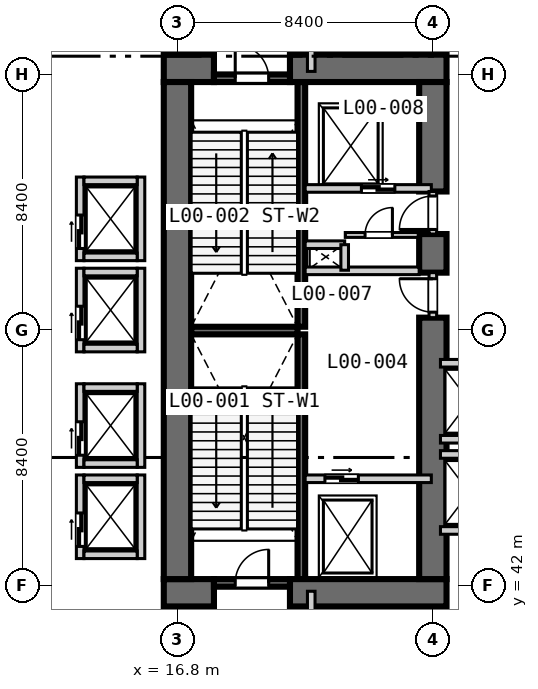
"""IFC4 building model, lengths in metres.
Left out: names, types, materials, properties, quantities, classifications, styles, units other than length and angle.
Written with IfcOpenShell. Run it as: python <this file> out.ifc"""

import sys

from ifc_helpers import new_model, si_unit, direction, frame, frame_2d, origin, place, context, subcontext, project, spatial, rectangle, extrude, element, fill, save


model = new_model("IFC4")
c1 = context("Model", 3, precision=1e-05, world=origin(), true_north=direction((0.0, 1.0)))
c2 = subcontext(c1, "Body", "Model", "MODEL_VIEW")
j1 = project(units=[si_unit("LENGTHUNIT", "METRE"), si_unit("PLANEANGLEUNIT", "RADIAN")], contexts=[c1])
p1 = place(None, origin())
s1 = spatial("IfcSite", under=j1, at=p1, CompositionType="ELEMENT")
p2 = place(p1, origin())
s2 = spatial("IfcBuilding", under=s1, at=p2, CompositionType="ELEMENT")
p3 = place(p2, origin())
s3 = spatial("IfcBuildingStorey", under=s2, at=p3, CompositionType="ELEMENT", Elevation=0.0)
for number, where, z_axis, x_axis in (
    (1, (20.875, 42.2, 0.0), (0.0, 0.0, 1.0), (0.0, 1.0, 0.0)),
    (2, (20.875, 50.5, 0.0), (0.0, 0.0, 1.0), (0.0, 1.0, 0.0)),
):
    element("IfcWall", number, at=place(p3, frame(where, z_axis=z_axis, x_axis=x_axis)), inside=s3, PredefinedType="SOLIDWALL", context=c2, shape_type="SweptSolid", body=[
        extrude(rectangle(XDim=8.05, YDim=0.25, at=frame_2d((4.025, 0.0))), origin(), (0.0, 0.0, 1.0), 5.65),
    ])
p4 = place(p3, frame((17.25, 50.375, 0.0), z_axis=(0.0, 0.0, 1.0), x_axis=(1.0, 0.0, 0.0)))
e3 = element("IfcWall", 3, at=p4, inside=s3, PredefinedType="SOLIDWALL", context=c2, shape_type="SweptSolid", body=[
    extrude(rectangle(XDim=3.5, YDim=0.25, at=frame_2d((1.75, 0.0))), origin(), (0.0, 0.0, 1.0), 5.65),
])
p5 = place(p3, frame((16.35, 41.75, 0.0), z_axis=(0.0, 0.0, 1.0), x_axis=(1.0, 0.0, 0.0)))
e4 = element("IfcWall", 4, at=p5, inside=s3, PredefinedType="SHEAR", context=c2, shape_type="SweptSolid", body=[
    extrude(rectangle(XDim=1.65, YDim=0.9, at=frame_2d((0.825, 0.0))), origin(), (0.0, 0.0, 1.0), 5.65),
])
p6 = place(p3, frame((20.5, 41.75, 0.0), z_axis=(0.0, 0.0, 1.0), x_axis=(1.0, 0.0, 0.0)))
e5 = element("IfcWall", 5, at=p6, inside=s3, PredefinedType="SHEAR", context=c2, shape_type="SweptSolid", body=[
    extrude(rectangle(XDim=5.15, YDim=0.9, at=frame_2d((2.575, 0.0))), origin(), (0.0, 0.0, 1.0), 5.65),
])
p7 = place(p3, frame((16.35, 59.0, 0.0), z_axis=(0.0, 0.0, 1.0), x_axis=(1.0, 0.0, 0.0)))
e6 = element("IfcWall", 6, at=p7, inside=s3, PredefinedType="SHEAR", context=c2, shape_type="SweptSolid", body=[
    extrude(rectangle(XDim=1.65, YDim=0.9, at=frame_2d((0.825, 0.0))), origin(), (0.0, 0.0, 1.0), 5.65),
])
p8 = place(p3, frame((20.5, 59.0, 0.0), z_axis=(0.0, 0.0, 1.0), x_axis=(1.0, 0.0, 0.0)))
e7 = element("IfcWall", 7, at=p8, inside=s3, PredefinedType="SHEAR", context=c2, shape_type="SweptSolid", body=[
    extrude(rectangle(XDim=5.15, YDim=0.9, at=frame_2d((2.575, 0.0))), origin(), (0.0, 0.0, 1.0), 5.65),
])
p9 = place(p3, frame((16.8, 42.2, 0.0), z_axis=(0.0, 0.0, 1.0), x_axis=(0.0, 1.0, 0.0)))
e8 = element("IfcWall", 8, at=p9, inside=s3, PredefinedType="SHEAR", context=c2, shape_type="SweptSolid", body=[
    extrude(rectangle(XDim=16.35, YDim=0.9, at=frame_2d((8.175, 0.0))), origin(), (0.0, 0.0, 1.0), 5.65),
])
p10 = place(p3, frame((25.2, 42.2, 0.0), z_axis=(0.0, 0.0, 1.0), x_axis=(0.0, 1.0, 0.0)))
e9 = element("IfcWall", 9, at=p10, inside=s3, PredefinedType="SHEAR", context=c2, shape_type="SweptSolid", body=[
    extrude(rectangle(XDim=8.6, YDim=0.9, at=frame_2d((4.3, 0.0))), origin(), (0.0, 0.0, 1.0), 5.65),
])
p11 = place(p3, frame((25.2, 52.28, 0.0), z_axis=(0.0, 0.0, 1.0), x_axis=(0.0, 1.0, 0.0)))
e10 = element("IfcWall", 10, at=p11, inside=s3, PredefinedType="SHEAR", context=c2, shape_type="SweptSolid", body=[
    extrude(rectangle(XDim=1.27, YDim=0.9, at=frame_2d((0.635, 0.0))), origin(), (0.0, 0.0, 1.0), 5.65),
])
p12 = place(p3, frame((25.2, 54.95, 0.0), z_axis=(0.0, 0.0, 1.0), x_axis=(0.0, 1.0, 0.0)))
e11 = element("IfcWall", 11, at=p12, inside=s3, PredefinedType="SHEAR", context=c2, shape_type="SweptSolid", body=[
    extrude(rectangle(XDim=3.6, YDim=0.9, at=frame_2d((1.8, 0.0))), origin(), (0.0, 0.0, 1.0), 5.65),
])
p13 = place(p3, frame((18.0, 42.075, 0.0), z_axis=(0.0, 0.0, 1.0), x_axis=(1.0, 0.0, 0.0)))
e12 = element("IfcWall", 12, at=p13, inside=s3, PredefinedType="SOLIDWALL", context=c2, shape_type="SweptSolid", body=[
    extrude(rectangle(XDim=2.5, YDim=0.25, at=frame_2d((1.25, 0.0))), origin(), (0.0, 0.0, 1.0), 5.65),
])
p14 = place(p13, frame((0.7, 0.0, 0.0)))
e13 = element("IfcOpeningElement", 13, at=p14, cuts=e12, PredefinedType="OPENING", context=c2, shape_type="SweptSolid", body=[
    extrude(rectangle(XDim=1.1, YDim=2.15, at=frame_2d((0.55, 1.075))), frame((0.0, 0.135, 0.0), z_axis=(0.0, -1.0, 0.0), x_axis=(1.0, 0.0, 0.0)), (0.0, 0.0, 1.0), 0.27),
])
p15 = place(p3, frame((18.0, 58.675, 0.0), z_axis=(0.0, 0.0, 1.0), x_axis=(1.0, 0.0, 0.0)))
e14 = element("IfcWall", 14, at=p15, inside=s3, PredefinedType="SOLIDWALL", context=c2, shape_type="SweptSolid", body=[
    extrude(rectangle(XDim=2.5, YDim=0.25, at=frame_2d((1.25, 0.0))), origin(), (0.0, 0.0, 1.0), 5.65),
])
p16 = place(p15, frame((0.7, 0.0, 0.0)))
e15 = element("IfcOpeningElement", 15, at=p16, cuts=e14, PredefinedType="OPENING", context=c2, shape_type="SweptSolid", body=[
    extrude(rectangle(XDim=1.1, YDim=2.15, at=frame_2d((0.55, 1.075))), frame((0.0, 0.135, 0.0), z_axis=(0.0, -1.0, 0.0), x_axis=(1.0, 0.0, 0.0)), (0.0, 0.0, 1.0), 0.27),
])
p17 = place(p3, frame((21.0, 45.5, 0.0), z_axis=(0.0, 0.0, 1.0), x_axis=(1.0, 0.0, 0.0)))
e16 = element("IfcWall", 16, at=p17, inside=s3, PredefinedType="SOLIDWALL", context=c2, shape_type="SweptSolid", body=[
    extrude(rectangle(XDim=4.15, YDim=0.25, at=frame_2d((2.075, 0.0))), origin(), (0.0, 0.0, 1.0), 5.65),
])
p18 = place(p17, frame((0.65, 0.0, 0.0)))
e17 = element("IfcOpeningElement", 17, at=p18, cuts=e16, PredefinedType="OPENING", context=c2, shape_type="SweptSolid", body=[
    extrude(rectangle(XDim=1.1, YDim=2.15, at=frame_2d((0.55, 1.075))), frame((0.0, 0.135, 0.0), z_axis=(0.0, -1.0, 0.0), x_axis=(1.0, 0.0, 0.0)), (0.0, 0.0, 1.0), 0.27),
])
p19 = place(p3, frame((25.2, 50.8, 0.0), z_axis=(0.0, 0.0, 1.0), x_axis=(0.0, 1.0, 0.0)))
e18 = element("IfcWall", 18, at=p19, inside=s3, PredefinedType="SOLIDWALL", context=c2, shape_type="SweptSolid", body=[
    extrude(rectangle(XDim=1.48, YDim=0.25, at=frame_2d((0.74, 0.0))), origin(), (0.0, 0.0, 1.0), 5.65),
])
p20 = place(p19, frame((0.18, 0.0, 0.0)))
e19 = element("IfcOpeningElement", 19, at=p20, cuts=e18, PredefinedType="OPENING", context=c2, shape_type="SweptSolid", body=[
    extrude(rectangle(XDim=1.1, YDim=2.15, at=frame_2d((0.55, 1.075))), frame((0.0, 0.135, 0.0), z_axis=(0.0, -1.0, 0.0), x_axis=(1.0, 0.0, 0.0)), (0.0, 0.0, 1.0), 0.27),
])
p21 = place(p3, frame((21.0, 52.34, 0.0), z_axis=(0.0, 0.0, 1.0), x_axis=(1.0, 0.0, 0.0)))
e20 = element("IfcWall", 20, at=p21, inside=s3, PredefinedType="SOLIDWALL", context=c2, shape_type="SweptSolid", body=[
    extrude(rectangle(XDim=3.75, YDim=0.25, at=frame_2d((1.875, 0.0))), origin(), (0.0, 0.0, 1.0), 5.65),
])
p22 = place(p3, frame((21.0, 55.05, 0.0), z_axis=(0.0, 0.0, 1.0), x_axis=(1.0, 0.0, 0.0)))
e21 = element("IfcWall", 21, at=p22, inside=s3, PredefinedType="SOLIDWALL", context=c2, shape_type="SweptSolid", body=[
    extrude(rectangle(XDim=4.15, YDim=0.25, at=frame_2d((2.075, 0.0))), origin(), (0.0, 0.0, 1.0), 5.65),
])
p23 = place(p22, frame((1.85, 0.0, 0.0)))
e22 = element("IfcOpeningElement", 22, at=p23, cuts=e21, PredefinedType="OPENING", context=c2, shape_type="SweptSolid", body=[
    extrude(rectangle(XDim=1.1, YDim=2.15, at=frame_2d((0.55, 1.075))), frame((0.0, 0.135, 0.0), z_axis=(0.0, -1.0, 0.0), x_axis=(1.0, 0.0, 0.0)), (0.0, 0.0, 1.0), 0.27),
])
p24 = place(p3, frame((25.2, 53.55, 0.0), z_axis=(0.0, 0.0, 1.0), x_axis=(0.0, 1.0, 0.0)))
e23 = element("IfcWall", 23, at=p24, inside=s3, PredefinedType="SOLIDWALL", context=c2, shape_type="SweptSolid", body=[
    extrude(rectangle(XDim=1.4, YDim=0.25, at=frame_2d((0.7, 0.0))), origin(), (0.0, 0.0, 1.0), 5.65),
])
p25 = place(p24, frame((0.15, 0.0, 0.0)))
e24 = element("IfcOpeningElement", 24, at=p25, cuts=e23, PredefinedType="OPENING", context=c2, shape_type="SweptSolid", body=[
    extrude(rectangle(XDim=1.1, YDim=2.15, at=frame_2d((0.55, 1.075))), frame((0.0, 0.135, 0.0), z_axis=(0.0, -1.0, 0.0), x_axis=(1.0, 0.0, 0.0)), (0.0, 0.0, 1.0), 0.27),
])
p26 = place(p3, frame((21.0, 53.2, 0.0), z_axis=(0.0, 0.0, 1.0), x_axis=(1.0, 0.0, 0.0)))
e25 = element("IfcWall", 25, at=p26, inside=s3, PredefinedType="SOLIDWALL", context=c2, shape_type="SweptSolid", body=[
    extrude(rectangle(XDim=1.3, YDim=0.25, at=frame_2d((0.65, 0.0))), origin(), (0.0, 0.0, 1.0), 5.65),
])
p27 = place(p3, frame((22.3, 52.36, 0.0), z_axis=(0.0, 0.0, 1.0), x_axis=(0.0, 1.0, 0.0)))
e26 = element("IfcWall", 26, at=p27, inside=s3, PredefinedType="SOLIDWALL", context=c2, shape_type="SweptSolid", body=[
    extrude(rectangle(XDim=0.84, YDim=0.25, at=frame_2d((0.42, 0.0))), origin(), (0.0, 0.0, 1.0), 5.65),
])
p28 = place(p3, frame((22.32, 53.52, 0.0), z_axis=(0.0, 0.0, 1.0), x_axis=(1.0, 0.0, 0.0)))
e27 = element("IfcWall", 27, at=p28, inside=s3, PredefinedType="PARTITIONING", context=c2, shape_type="SweptSolid", body=[
    extrude(rectangle(XDim=2.4, YDim=0.16, at=frame_2d((1.2, 0.0))), origin(), (0.0, 0.0, 1.0), 5.65),
])
p29 = place(p28, frame((0.65, 0.0, 0.0)))
e28 = element("IfcOpeningElement", 28, at=p29, cuts=e27, PredefinedType="OPENING", context=c2, shape_type="SweptSolid", body=[
    extrude(rectangle(XDim=0.9, YDim=2.1, at=frame_2d((0.45, 1.05))), frame((0.0, 0.09, 0.0), z_axis=(0.0, -1.0, 0.0), x_axis=(1.0, 0.0, 0.0)), (0.0, 0.0, 1.0), 0.18),
])
p30 = place(p3, frame((13.6, 42.875, 0.0), z_axis=(0.0, 0.0, 1.0), x_axis=(0.0, 1.0, 0.0)))
e29 = element("IfcWall", 29, at=p30, inside=s3, PredefinedType="SOLIDWALL", context=c2, shape_type="SweptSolid", body=[
    extrude(rectangle(XDim=2.75, YDim=0.25, at=frame_2d((1.375, 0.0))), origin(), (0.0, 0.0, 1.0), 5.65),
])
p31 = place(p30, frame((0.4, 0.0, 0.0)))
e30 = element("IfcOpeningElement", 30, at=p31, cuts=e29, PredefinedType="OPENING", context=c2, shape_type="SweptSolid", body=[
    extrude(rectangle(XDim=1.1, YDim=2.15, at=frame_2d((0.55, 1.075))), frame((0.0, 0.135, 0.0), z_axis=(0.0, -1.0, 0.0), x_axis=(1.0, 0.0, 0.0)), (0.0, 0.0, 1.0), 0.27),
])
p32 = place(p3, frame((15.6, 42.875, 0.0), z_axis=(0.0, 0.0, 1.0), x_axis=(0.0, 1.0, 0.0)))
e31 = element("IfcWall", 31, at=p32, inside=s3, PredefinedType="SOLIDWALL", context=c2, shape_type="SweptSolid", body=[
    extrude(rectangle(XDim=2.75, YDim=0.25, at=frame_2d((1.375, 0.0))), origin(), (0.0, 0.0, 1.0), 5.65),
])
for number, where, z_axis, x_axis in (
    (32, (13.725, 43.0, 0.0), (0.0, 0.0, 1.0), (1.0, 0.0, 0.0)),
    (33, (13.725, 45.5, 0.0), (0.0, 0.0, 1.0), (1.0, 0.0, 0.0)),
):
    element("IfcWall", number, at=place(p3, frame(where, z_axis=z_axis, x_axis=x_axis)), inside=s3, PredefinedType="SOLIDWALL", context=c2, shape_type="SweptSolid", body=[
        extrude(rectangle(XDim=1.75, YDim=0.25, at=frame_2d((0.875, 0.0))), origin(), (0.0, 0.0, 1.0), 5.65),
    ])
p33 = place(p3, frame((13.6, 45.875, 0.0), z_axis=(0.0, 0.0, 1.0), x_axis=(0.0, 1.0, 0.0)))
e34 = element("IfcWall", 34, at=p33, inside=s3, PredefinedType="SOLIDWALL", context=c2, shape_type="SweptSolid", body=[
    extrude(rectangle(XDim=2.75, YDim=0.25, at=frame_2d((1.375, 0.0))), origin(), (0.0, 0.0, 1.0), 5.65),
])
p34 = place(p33, frame((0.4, 0.0, 0.0)))
e35 = element("IfcOpeningElement", 35, at=p34, cuts=e34, PredefinedType="OPENING", context=c2, shape_type="SweptSolid", body=[
    extrude(rectangle(XDim=1.1, YDim=2.15, at=frame_2d((0.55, 1.075))), frame((0.0, 0.135, 0.0), z_axis=(0.0, -1.0, 0.0), x_axis=(1.0, 0.0, 0.0)), (0.0, 0.0, 1.0), 0.27),
])
p35 = place(p3, frame((15.6, 45.875, 0.0), z_axis=(0.0, 0.0, 1.0), x_axis=(0.0, 1.0, 0.0)))
e36 = element("IfcWall", 36, at=p35, inside=s3, PredefinedType="SOLIDWALL", context=c2, shape_type="SweptSolid", body=[
    extrude(rectangle(XDim=2.75, YDim=0.25, at=frame_2d((1.375, 0.0))), origin(), (0.0, 0.0, 1.0), 5.65),
])
for number, where, z_axis, x_axis in (
    (37, (13.725, 46.0, 0.0), (0.0, 0.0, 1.0), (1.0, 0.0, 0.0)),
    (38, (13.725, 48.5, 0.0), (0.0, 0.0, 1.0), (1.0, 0.0, 0.0)),
):
    element("IfcWall", number, at=place(p3, frame(where, z_axis=z_axis, x_axis=x_axis)), inside=s3, PredefinedType="SOLIDWALL", context=c2, shape_type="SweptSolid", body=[
        extrude(rectangle(XDim=1.75, YDim=0.25, at=frame_2d((0.875, 0.0))), origin(), (0.0, 0.0, 1.0), 5.65),
    ])
p36 = place(p3, frame((13.6, 49.675, 0.0), z_axis=(0.0, 0.0, 1.0), x_axis=(0.0, 1.0, 0.0)))
e39 = element("IfcWall", 39, at=p36, inside=s3, PredefinedType="SOLIDWALL", context=c2, shape_type="SweptSolid", body=[
    extrude(rectangle(XDim=2.75, YDim=0.25, at=frame_2d((1.375, 0.0))), origin(), (0.0, 0.0, 1.0), 5.65),
])
p37 = place(p36, frame((0.4, 0.0, 0.0)))
e40 = element("IfcOpeningElement", 40, at=p37, cuts=e39, PredefinedType="OPENING", context=c2, shape_type="SweptSolid", body=[
    extrude(rectangle(XDim=1.1, YDim=2.15, at=frame_2d((0.55, 1.075))), frame((0.0, 0.135, 0.0), z_axis=(0.0, -1.0, 0.0), x_axis=(1.0, 0.0, 0.0)), (0.0, 0.0, 1.0), 0.27),
])
p38 = place(p3, frame((15.6, 49.675, 0.0), z_axis=(0.0, 0.0, 1.0), x_axis=(0.0, 1.0, 0.0)))
e41 = element("IfcWall", 41, at=p38, inside=s3, PredefinedType="SOLIDWALL", context=c2, shape_type="SweptSolid", body=[
    extrude(rectangle(XDim=2.75, YDim=0.25, at=frame_2d((1.375, 0.0))), origin(), (0.0, 0.0, 1.0), 5.65),
])
for number, where, z_axis, x_axis in (
    (42, (13.725, 49.8, 0.0), (0.0, 0.0, 1.0), (1.0, 0.0, 0.0)),
    (43, (13.725, 52.3, 0.0), (0.0, 0.0, 1.0), (1.0, 0.0, 0.0)),
):
    element("IfcWall", number, at=place(p3, frame(where, z_axis=z_axis, x_axis=x_axis)), inside=s3, PredefinedType="SOLIDWALL", context=c2, shape_type="SweptSolid", body=[
        extrude(rectangle(XDim=1.75, YDim=0.25, at=frame_2d((0.875, 0.0))), origin(), (0.0, 0.0, 1.0), 5.65),
    ])
p39 = place(p3, frame((13.6, 52.675, 0.0), z_axis=(0.0, 0.0, 1.0), x_axis=(0.0, 1.0, 0.0)))
e44 = element("IfcWall", 44, at=p39, inside=s3, PredefinedType="SOLIDWALL", context=c2, shape_type="SweptSolid", body=[
    extrude(rectangle(XDim=2.75, YDim=0.25, at=frame_2d((1.375, 0.0))), origin(), (0.0, 0.0, 1.0), 5.65),
])
p40 = place(p39, frame((0.4, 0.0, 0.0)))
e45 = element("IfcOpeningElement", 45, at=p40, cuts=e44, PredefinedType="OPENING", context=c2, shape_type="SweptSolid", body=[
    extrude(rectangle(XDim=1.1, YDim=2.15, at=frame_2d((0.55, 1.075))), frame((0.0, 0.135, 0.0), z_axis=(0.0, -1.0, 0.0), x_axis=(1.0, 0.0, 0.0)), (0.0, 0.0, 1.0), 0.27),
])
p41 = place(p3, frame((15.6, 52.675, 0.0), z_axis=(0.0, 0.0, 1.0), x_axis=(0.0, 1.0, 0.0)))
e46 = element("IfcWall", 46, at=p41, inside=s3, PredefinedType="SOLIDWALL", context=c2, shape_type="SweptSolid", body=[
    extrude(rectangle(XDim=2.75, YDim=0.25, at=frame_2d((1.375, 0.0))), origin(), (0.0, 0.0, 1.0), 5.65),
])
for number, where, z_axis, x_axis in (
    (47, (13.725, 52.8, 0.0), (0.0, 0.0, 1.0), (1.0, 0.0, 0.0)),
    (48, (13.725, 55.3, 0.0), (0.0, 0.0, 1.0), (1.0, 0.0, 0.0)),
):
    element("IfcWall", number, at=place(p3, frame(where, z_axis=z_axis, x_axis=x_axis)), inside=s3, PredefinedType="SOLIDWALL", context=c2, shape_type="SweptSolid", body=[
        extrude(rectangle(XDim=1.75, YDim=0.25, at=frame_2d((0.875, 0.0))), origin(), (0.0, 0.0, 1.0), 5.65),
    ])
for number, where, z_axis, x_axis in (
    (49, (25.45, 43.8, 0.0), (0.0, 0.0, 1.0), (1.0, 0.0, 0.0)),
    (50, (25.45, 46.3, 0.0), (0.0, 0.0, 1.0), (1.0, 0.0, 0.0)),
    (51, (25.45, 46.8, 0.0), (0.0, 0.0, 1.0), (1.0, 0.0, 0.0)),
    (52, (25.45, 49.3, 0.0), (0.0, 0.0, 1.0), (1.0, 0.0, 0.0)),
):
    element("IfcWall", number, at=place(p3, frame(where, z_axis=z_axis, x_axis=x_axis)), inside=s3, PredefinedType="SOLIDWALL", context=c2, shape_type="SweptSolid", body=[
        extrude(rectangle(XDim=1.825, YDim=0.25, at=frame_2d((0.913, 0.0))), origin(), (0.0, 0.0, 1.0), 5.65),
    ])
p42 = place(p3, frame((21.2, 39.2, 0.0), z_axis=(0.0, 0.0, 1.0), x_axis=(0.0, 1.0, 0.0)))
e53 = element("IfcWall", 53, at=p42, inside=s3, PredefinedType="SOLIDWALL", context=c2, shape_type="SweptSolid", body=[
    extrude(rectangle(XDim=2.6, YDim=0.25, at=frame_2d((1.3, 0.0))), origin(), (0.0, 0.0, 1.0), 5.65),
])
p43 = place(p3, frame((21.2, 58.9, 0.0), z_axis=(0.0, 0.0, 1.0), x_axis=(0.0, 1.0, 0.0)))
e54 = element("IfcWall", 54, at=p43, inside=s3, PredefinedType="SOLIDWALL", context=c2, shape_type="SweptSolid", body=[
    extrude(rectangle(XDim=4.7, YDim=0.25, at=frame_2d((2.35, 0.0))), origin(), (0.0, 0.0, 1.0), 5.65),
])
p44 = place(p14, origin())
e55 = element("IfcDoor", 55, at=p44, inside=s3, OperationType="SINGLE_SWING_RIGHT", PredefinedType="DOOR", context=c2, shape_type="SweptSolid", body=[
    extrude(rectangle(XDim=1.1, YDim=2.15, at=frame_2d((0.55, 1.075))), frame((0.0, 0.025, 0.0), z_axis=(0.0, -1.0, 0.0), x_axis=(1.0, 0.0, 0.0)), (0.0, 0.0, 1.0), 0.05),
])
fill(e13, e55)
p45 = place(p16, origin())
e56 = element("IfcDoor", 56, at=p45, inside=s3, OperationType="SINGLE_SWING_LEFT", PredefinedType="DOOR", context=c2, shape_type="SweptSolid", body=[
    extrude(rectangle(XDim=1.1, YDim=2.15, at=frame_2d((0.55, 1.075))), frame((0.0, 0.025, 0.0), z_axis=(0.0, -1.0, 0.0), x_axis=(1.0, 0.0, 0.0)), (0.0, 0.0, 1.0), 0.05),
])
fill(e15, e56)
p46 = place(p18, origin())
e57 = element("IfcDoor", 57, at=p46, inside=s3, OperationType="SLIDING_TO_LEFT", PredefinedType="DOOR", context=c2, shape_type="SweptSolid", body=[
    extrude(rectangle(XDim=1.1, YDim=2.15, at=frame_2d((0.55, 1.075))), frame((0.0, 0.025, 0.0), z_axis=(0.0, -1.0, 0.0), x_axis=(1.0, 0.0, 0.0)), (0.0, 0.0, 1.0), 0.05),
])
fill(e17, e57)
p47 = place(p20, origin())
e58 = element("IfcDoor", 58, at=p47, inside=s3, OperationType="SINGLE_SWING_RIGHT", PredefinedType="DOOR", context=c2, shape_type="SweptSolid", body=[
    extrude(rectangle(XDim=1.1, YDim=2.15, at=frame_2d((0.55, 1.075))), frame((0.0, 0.025, 0.0), z_axis=(0.0, -1.0, 0.0), x_axis=(1.0, 0.0, 0.0)), (0.0, 0.0, 1.0), 0.05),
])
fill(e19, e58)
p48 = place(p23, origin())
e59 = element("IfcDoor", 59, at=p48, inside=s3, OperationType="SLIDING_TO_LEFT", PredefinedType="DOOR", context=c2, shape_type="SweptSolid", body=[
    extrude(rectangle(XDim=1.1, YDim=2.15, at=frame_2d((0.55, 1.075))), frame((0.0, 0.025, 0.0), z_axis=(0.0, -1.0, 0.0), x_axis=(1.0, 0.0, 0.0)), (0.0, 0.0, 1.0), 0.05),
])
fill(e22, e59)
p49 = place(p25, origin())
e60 = element("IfcDoor", 60, at=p49, inside=s3, OperationType="SINGLE_SWING_LEFT", PredefinedType="DOOR", context=c2, shape_type="SweptSolid", body=[
    extrude(rectangle(XDim=1.1, YDim=2.15, at=frame_2d((0.55, 1.075))), frame((0.0, 0.025, 0.0), z_axis=(0.0, -1.0, 0.0), x_axis=(1.0, 0.0, 0.0)), (0.0, 0.0, 1.0), 0.05),
])
fill(e24, e60)
p50 = place(p29, origin())
e61 = element("IfcDoor", 61, at=p50, inside=s3, OperationType="SINGLE_SWING_RIGHT", PredefinedType="DOOR", context=c2, shape_type="SweptSolid", body=[
    extrude(rectangle(XDim=0.9, YDim=2.1, at=frame_2d((0.45, 1.05))), frame((0.0, 0.025, 0.0), z_axis=(0.0, -1.0, 0.0), x_axis=(1.0, 0.0, 0.0)), (0.0, 0.0, 1.0), 0.05),
])
fill(e28, e61)
p51 = place(p31, origin())
e62 = element("IfcDoor", 62, at=p51, inside=s3, OperationType="SLIDING_TO_LEFT", PredefinedType="DOOR", context=c2, shape_type="SweptSolid", body=[
    extrude(rectangle(XDim=1.1, YDim=2.15, at=frame_2d((0.55, 1.075))), frame((0.0, 0.025, 0.0), z_axis=(0.0, -1.0, 0.0), x_axis=(1.0, 0.0, 0.0)), (0.0, 0.0, 1.0), 0.05),
])
fill(e30, e62)
p52 = place(p34, origin())
e63 = element("IfcDoor", 63, at=p52, inside=s3, OperationType="SLIDING_TO_LEFT", PredefinedType="DOOR", context=c2, shape_type="SweptSolid", body=[
    extrude(rectangle(XDim=1.1, YDim=2.15, at=frame_2d((0.55, 1.075))), frame((0.0, 0.025, 0.0), z_axis=(0.0, -1.0, 0.0), x_axis=(1.0, 0.0, 0.0)), (0.0, 0.0, 1.0), 0.05),
])
fill(e35, e63)
p53 = place(p37, origin())
e64 = element("IfcDoor", 64, at=p53, inside=s3, OperationType="SLIDING_TO_LEFT", PredefinedType="DOOR", context=c2, shape_type="SweptSolid", body=[
    extrude(rectangle(XDim=1.1, YDim=2.15, at=frame_2d((0.55, 1.075))), frame((0.0, 0.025, 0.0), z_axis=(0.0, -1.0, 0.0), x_axis=(1.0, 0.0, 0.0)), (0.0, 0.0, 1.0), 0.05),
])
fill(e40, e64)
p54 = place(p40, origin())
e65 = element("IfcDoor", 65, at=p54, inside=s3, OperationType="SLIDING_TO_LEFT", PredefinedType="DOOR", context=c2, shape_type="SweptSolid", body=[
    extrude(rectangle(XDim=1.1, YDim=2.15, at=frame_2d((0.55, 1.075))), frame((0.0, 0.025, 0.0), z_axis=(0.0, -1.0, 0.0), x_axis=(1.0, 0.0, 0.0)), (0.0, 0.0, 1.0), 0.05),
])
fill(e45, e65)
save(model, sys.argv[1])
